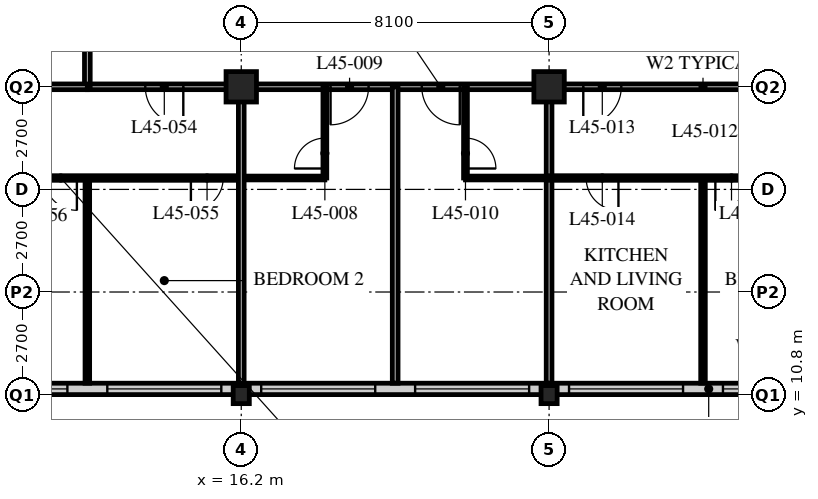
"""IFC4 building model, lengths in metres.
Left out: names, types, materials, properties, quantities, classifications, styles, units other than length and angle.
Written with IfcOpenShell. Run it as: python <this file> out.ifc"""

import sys

from ifc_helpers import new_model, si_unit, direction, frame, frame_2d, origin, origin_2d, place, context, subcontext, project, spatial, rectangle, hollow_rectangle, i_section, extrude, element, fill, save


model = new_model("IFC4")
c1 = context("Model", 3, precision=1e-05, world=origin(), true_north=direction((0.0, 1.0)))
c2 = subcontext(c1, "Body", "Model", "MODEL_VIEW")
j1 = project(units=[si_unit("LENGTHUNIT", "METRE"), si_unit("PLANEANGLEUNIT", "RADIAN")], contexts=[c1])
p1 = place(None, origin())
s1 = spatial("IfcSite", under=j1, at=p1, CompositionType="ELEMENT")
p2 = place(p1, origin())
s2 = spatial("IfcBuilding", under=s1, at=p2, CompositionType="ELEMENT")
p3 = place(p2, frame((0.0, 0.0, 177.6)))
s3 = spatial("IfcBuildingStorey", under=s2, at=p3, CompositionType="ELEMENT", Elevation=177.6)
p4 = place(p3, frame((16.2, 10.8, 0.0), z_axis=(0.0, 0.0, 1.0), x_axis=(1.0, 0.0, 0.0)))
e1 = element("IfcColumn", 1, at=p4, inside=s3, PredefinedType="COLUMN", context=c2, shape_type="SweptSolid", body=[
    extrude(i_section(OverallWidth=0.424, OverallDepth=0.475, WebThickness=0.048, FlangeThickness=0.077, FilletRadius=0.015, at=origin_2d()), origin(), (0.0, 0.0, 1.0), 3.6),
])
p5 = place(p3, frame((16.2, 18.9, 0.0), z_axis=(0.0, 0.0, 1.0), x_axis=(1.0, 0.0, 0.0)))
e2 = element("IfcColumn", 2, at=p5, inside=s3, PredefinedType="COLUMN", context=c2, shape_type="SweptSolid", body=[
    extrude(hollow_rectangle(XDim=0.8, YDim=0.8, WallThickness=0.08, at=origin_2d()), origin(), (0.0, 0.0, 1.0), 3.6),
])
p6 = place(p3, frame((24.3, 10.8, 0.0), z_axis=(0.0, 0.0, 1.0), x_axis=(1.0, 0.0, 0.0)))
e3 = element("IfcColumn", 3, at=p6, inside=s3, PredefinedType="COLUMN", context=c2, shape_type="SweptSolid", body=[
    extrude(i_section(OverallWidth=0.424, OverallDepth=0.475, WebThickness=0.048, FlangeThickness=0.077, FilletRadius=0.015, at=origin_2d()), origin(), (0.0, 0.0, 1.0), 3.6),
])
p7 = place(p3, frame((24.3, 18.9, 0.0), z_axis=(0.0, 0.0, 1.0), x_axis=(1.0, 0.0, 0.0)))
e4 = element("IfcColumn", 4, at=p7, inside=s3, PredefinedType="COLUMN", context=c2, shape_type="SweptSolid", body=[
    extrude(hollow_rectangle(XDim=0.8, YDim=0.8, WallThickness=0.08, at=origin_2d()), origin(), (0.0, 0.0, 1.0), 3.6),
])
p8 = place(p3, frame((8.4, 10.95, 0.0), z_axis=(0.0, 0.0, 1.0), x_axis=(1.0, 0.0, 0.0)))
e5 = element("IfcWall", 5, at=p8, inside=s3, PredefinedType="SOLIDWALL", context=c2, shape_type="SweptSolid", body=[
    extrude(rectangle(XDim=40.2, YDim=0.3, at=frame_2d((20.1, 0.0))), origin(), (0.0, 0.0, 1.0), 3.39),
])
p9 = place(p8, frame((0.225, 0.0, 0.6)))
e6 = element("IfcOpeningElement", 6, at=p9, cuts=e5, PredefinedType="OPENING", context=c2, shape_type="SweptSolid", body=[
    extrude(rectangle(XDim=3.0, YDim=2.4, at=frame_2d((1.5, 1.2))), frame((0.0, 0.16, 0.0), z_axis=(0.0, -1.0, 0.0), x_axis=(1.0, 0.0, 0.0)), (0.0, 0.0, 1.0), 0.32),
])
p10 = place(p8, frame((4.275, 0.0, 0.6)))
e7 = element("IfcOpeningElement", 7, at=p10, cuts=e5, PredefinedType="OPENING", context=c2, shape_type="SweptSolid", body=[
    extrude(rectangle(XDim=3.0, YDim=2.4, at=frame_2d((1.5, 1.2))), frame((0.0, 0.16, 0.0), z_axis=(0.0, -1.0, 0.0), x_axis=(1.0, 0.0, 0.0)), (0.0, 0.0, 1.0), 0.32),
])
p11 = place(p8, frame((8.325, 0.0, 0.6)))
e8 = element("IfcOpeningElement", 8, at=p11, cuts=e5, PredefinedType="OPENING", context=c2, shape_type="SweptSolid", body=[
    extrude(rectangle(XDim=3.0, YDim=2.4, at=frame_2d((1.5, 1.2))), frame((0.0, 0.16, 0.0), z_axis=(0.0, -1.0, 0.0), x_axis=(1.0, 0.0, 0.0)), (0.0, 0.0, 1.0), 0.32),
])
p12 = place(p8, frame((12.375, 0.0, 0.6)))
e9 = element("IfcOpeningElement", 9, at=p12, cuts=e5, PredefinedType="OPENING", context=c2, shape_type="SweptSolid", body=[
    extrude(rectangle(XDim=3.0, YDim=2.4, at=frame_2d((1.5, 1.2))), frame((0.0, 0.16, 0.0), z_axis=(0.0, -1.0, 0.0), x_axis=(1.0, 0.0, 0.0)), (0.0, 0.0, 1.0), 0.32),
])
p13 = place(p8, frame((16.425, 0.0, 0.6)))
e10 = element("IfcOpeningElement", 10, at=p13, cuts=e5, PredefinedType="OPENING", context=c2, shape_type="SweptSolid", body=[
    extrude(rectangle(XDim=3.0, YDim=2.4, at=frame_2d((1.5, 1.2))), frame((0.0, 0.16, 0.0), z_axis=(0.0, -1.0, 0.0), x_axis=(1.0, 0.0, 0.0)), (0.0, 0.0, 1.0), 0.32),
])
p14 = place(p8, frame((20.475, 0.0, 0.6)))
e11 = element("IfcOpeningElement", 11, at=p14, cuts=e5, PredefinedType="OPENING", context=c2, shape_type="SweptSolid", body=[
    extrude(rectangle(XDim=3.0, YDim=2.4, at=frame_2d((1.5, 1.2))), frame((0.0, 0.16, 0.0), z_axis=(0.0, -1.0, 0.0), x_axis=(1.0, 0.0, 0.0)), (0.0, 0.0, 1.0), 0.32),
])
p15 = place(p8, frame((24.525, 0.0, 0.6)))
e12 = element("IfcOpeningElement", 12, at=p15, cuts=e5, PredefinedType="OPENING", context=c2, shape_type="SweptSolid", body=[
    extrude(rectangle(XDim=3.0, YDim=2.4, at=frame_2d((1.5, 1.2))), frame((0.0, 0.16, 0.0), z_axis=(0.0, -1.0, 0.0), x_axis=(1.0, 0.0, 0.0)), (0.0, 0.0, 1.0), 0.32),
])
p16 = place(p8, frame((28.575, 0.0, 0.6)))
e13 = element("IfcOpeningElement", 13, at=p16, cuts=e5, PredefinedType="OPENING", context=c2, shape_type="SweptSolid", body=[
    extrude(rectangle(XDim=3.0, YDim=2.4, at=frame_2d((1.5, 1.2))), frame((0.0, 0.16, 0.0), z_axis=(0.0, -1.0, 0.0), x_axis=(1.0, 0.0, 0.0)), (0.0, 0.0, 1.0), 0.32),
])
p17 = place(p8, frame((32.625, 0.0, 0.6)))
e14 = element("IfcOpeningElement", 14, at=p17, cuts=e5, PredefinedType="OPENING", context=c2, shape_type="SweptSolid", body=[
    extrude(rectangle(XDim=3.0, YDim=2.4, at=frame_2d((1.5, 1.2))), frame((0.0, 0.16, 0.0), z_axis=(0.0, -1.0, 0.0), x_axis=(1.0, 0.0, 0.0)), (0.0, 0.0, 1.0), 0.32),
])
p18 = place(p8, frame((36.675, 0.0, 0.6)))
e15 = element("IfcOpeningElement", 15, at=p18, cuts=e5, PredefinedType="OPENING", context=c2, shape_type="SweptSolid", body=[
    extrude(rectangle(XDim=3.0, YDim=2.4, at=frame_2d((1.5, 1.2))), frame((0.0, 0.16, 0.0), z_axis=(0.0, -1.0, 0.0), x_axis=(1.0, 0.0, 0.0)), (0.0, 0.0, 1.0), 0.32),
])
p19 = place(p3, frame((12.15, 18.9, 0.0), z_axis=(0.0, 0.0, 1.0), x_axis=(1.0, 0.0, 0.0)))
e16 = element("IfcWall", 16, at=p19, inside=s3, PredefinedType="PARTITIONING", context=c2, shape_type="SweptSolid", body=[
    extrude(rectangle(XDim=32.4, YDim=0.15, at=frame_2d((16.2, 0.0))), origin(), (0.0, 0.0, 1.0), 2.778),
])
p20 = place(p19, frame((6.4, 0.0, 0.0)))
e17 = element("IfcOpeningElement", 17, at=p20, cuts=e16, PredefinedType="OPENING", context=c2, shape_type="SweptSolid", body=[
    extrude(rectangle(XDim=1.0, YDim=2.1, at=frame_2d((0.5, 1.05))), frame((0.0, 0.085, 0.0), z_axis=(0.0, -1.0, 0.0), x_axis=(1.0, 0.0, 0.0)), (0.0, 0.0, 1.0), 0.17),
])
p21 = place(p19, frame((8.8, 0.0, 0.0)))
e18 = element("IfcOpeningElement", 18, at=p21, cuts=e16, PredefinedType="OPENING", context=c2, shape_type="SweptSolid", body=[
    extrude(rectangle(XDim=1.0, YDim=2.1, at=frame_2d((0.5, 1.05))), frame((0.0, 0.085, 0.0), z_axis=(0.0, -1.0, 0.0), x_axis=(1.0, 0.0, 0.0)), (0.0, 0.0, 1.0), 0.17),
])
p22 = place(p19, frame((13.05, 0.0, 0.0)))
e19 = element("IfcOpeningElement", 19, at=p22, cuts=e16, PredefinedType="OPENING", context=c2, shape_type="SweptSolid", body=[
    extrude(rectangle(XDim=1.0, YDim=2.1, at=frame_2d((0.5, 1.05))), frame((0.0, 0.085, 0.0), z_axis=(0.0, -1.0, 0.0), x_axis=(1.0, 0.0, 0.0)), (0.0, 0.0, 1.0), 0.17),
])
p23 = place(p19, frame((22.6, 0.0, 0.0)))
e20 = element("IfcOpeningElement", 20, at=p23, cuts=e16, PredefinedType="OPENING", context=c2, shape_type="SweptSolid", body=[
    extrude(rectangle(XDim=1.0, YDim=2.1, at=frame_2d((0.5, 1.05))), frame((0.0, 0.085, 0.0), z_axis=(0.0, -1.0, 0.0), x_axis=(1.0, 0.0, 0.0)), (0.0, 0.0, 1.0), 0.17),
])
p24 = place(p19, frame((25.0, 0.0, 0.0)))
e21 = element("IfcOpeningElement", 21, at=p24, cuts=e16, PredefinedType="OPENING", context=c2, shape_type="SweptSolid", body=[
    extrude(rectangle(XDim=1.0, YDim=2.1, at=frame_2d((0.5, 1.05))), frame((0.0, 0.085, 0.0), z_axis=(0.0, -1.0, 0.0), x_axis=(1.0, 0.0, 0.0)), (0.0, 0.0, 1.0), 0.17),
])
p25 = place(p19, frame((1.525, 0.0, 0.0)))
e22 = element("IfcOpeningElement", 22, at=p25, cuts=e16, PredefinedType="OPENING", context=c2, shape_type="SweptSolid", body=[
    extrude(rectangle(XDim=1.0, YDim=2.1, at=frame_2d((0.5, 1.05))), frame((0.0, 0.085, 0.0), z_axis=(0.0, -1.0, 0.0), x_axis=(1.0, 0.0, 0.0)), (0.0, 0.0, 1.0), 0.17),
])
p26 = place(p19, frame((29.875, 0.0, 0.0)))
e23 = element("IfcOpeningElement", 23, at=p26, cuts=e16, PredefinedType="OPENING", context=c2, shape_type="SweptSolid", body=[
    extrude(rectangle(XDim=1.0, YDim=2.1, at=frame_2d((0.5, 1.05))), frame((0.0, 0.085, 0.0), z_axis=(0.0, -1.0, 0.0), x_axis=(1.0, 0.0, 0.0)), (0.0, 0.0, 1.0), 0.17),
])
p27 = place(p3, frame((12.15, 18.9, 0.0), z_axis=(0.0, 0.0, 1.0), x_axis=(0.0, 1.0, 0.0)))
e24 = element("IfcWall", 24, at=p27, inside=s3, PredefinedType="PARTITIONING", context=c2, shape_type="SweptSolid", body=[
    extrude(rectangle(XDim=24.3, YDim=0.15, at=frame_2d((12.15, 0.0))), origin(), (0.0, 0.0, 1.0), 3.39),
])
p28 = place(p27, frame((2.35, 0.0, 0.0)))
e25 = element("IfcOpeningElement", 25, at=p28, cuts=e24, PredefinedType="OPENING", context=c2, shape_type="SweptSolid", body=[
    extrude(rectangle(XDim=1.0, YDim=2.1, at=frame_2d((0.5, 1.05))), frame((0.0, 0.085, 0.0), z_axis=(0.0, -1.0, 0.0), x_axis=(1.0, 0.0, 0.0)), (0.0, 0.0, 1.0), 0.17),
])
p29 = place(p27, frame((6.4, 0.0, 0.0)))
e26 = element("IfcOpeningElement", 26, at=p29, cuts=e24, PredefinedType="OPENING", context=c2, shape_type="SweptSolid", body=[
    extrude(rectangle(XDim=1.0, YDim=2.1, at=frame_2d((0.5, 1.05))), frame((0.0, 0.085, 0.0), z_axis=(0.0, -1.0, 0.0), x_axis=(1.0, 0.0, 0.0)), (0.0, 0.0, 1.0), 0.17),
])
p30 = place(p27, frame((8.5, 0.0, 0.0)))
e27 = element("IfcOpeningElement", 27, at=p30, cuts=e24, PredefinedType="OPENING", context=c2, shape_type="SweptSolid", body=[
    extrude(rectangle(XDim=1.0, YDim=2.1, at=frame_2d((0.5, 1.05))), frame((0.0, 0.085, 0.0), z_axis=(0.0, -1.0, 0.0), x_axis=(1.0, 0.0, 0.0)), (0.0, 0.0, 1.0), 0.17),
])
p31 = place(p27, frame((16.6, 0.0, 0.0)))
e28 = element("IfcOpeningElement", 28, at=p31, cuts=e24, PredefinedType="OPENING", context=c2, shape_type="SweptSolid", body=[
    extrude(rectangle(XDim=1.0, YDim=2.1, at=frame_2d((0.5, 1.05))), frame((0.0, 0.085, 0.0), z_axis=(0.0, -1.0, 0.0), x_axis=(1.0, 0.0, 0.0)), (0.0, 0.0, 1.0), 0.17),
])
p32 = place(p3, frame((16.2, 16.5, 0.0), z_axis=(0.0, 0.0, 1.0), x_axis=(1.0, 0.0, 0.0)))
e29 = element("IfcWall", 29, at=p32, inside=s3, PredefinedType="PARTITIONING", context=c2, shape_type="SweptSolid", body=[
    extrude(rectangle(XDim=2.2, YDim=0.1, at=frame_2d((1.1, 0.0))), origin(), (0.0, 0.0, 1.0), 3.39),
])
p33 = place(p3, frame((18.4, 18.9, 0.0), z_axis=(0.0, 0.0, 1.0), x_axis=(0.0, -1.0, 0.0)))
e30 = element("IfcWall", 30, at=p33, inside=s3, PredefinedType="PARTITIONING", context=c2, shape_type="SweptSolid", body=[
    extrude(rectangle(XDim=2.4, YDim=0.1, at=frame_2d((1.2, 0.0))), origin(), (0.0, 0.0, 1.0), 3.39),
])
p34 = place(p33, frame((1.35, 0.0, 0.0)))
e31 = element("IfcOpeningElement", 31, at=p34, cuts=e30, PredefinedType="OPENING", context=c2, shape_type="SweptSolid", body=[
    extrude(rectangle(XDim=0.8, YDim=2.1, at=frame_2d((0.4, 1.05))), frame((0.0, 0.06, 0.0), z_axis=(0.0, -1.0, 0.0), x_axis=(1.0, 0.0, 0.0)), (0.0, 0.0, 1.0), 0.12),
])
p35 = place(p3, frame((20.25, 18.9, 0.0), z_axis=(0.0, 0.0, 1.0), x_axis=(0.0, -1.0, 0.0)))
e32 = element("IfcWall", 32, at=p35, inside=s3, PredefinedType="PARTITIONING", context=c2, shape_type="SweptSolid", body=[
    extrude(rectangle(XDim=7.8, YDim=0.15, at=frame_2d((3.9, 0.0))), origin(), (0.0, 0.0, 1.0), 3.39),
])
p36 = place(p3, frame((22.1, 16.5, 0.0), z_axis=(0.0, 0.0, 1.0), x_axis=(1.0, 0.0, 0.0)))
e33 = element("IfcWall", 33, at=p36, inside=s3, PredefinedType="PARTITIONING", context=c2, shape_type="SweptSolid", body=[
    extrude(rectangle(XDim=2.2, YDim=0.1, at=frame_2d((1.1, 0.0))), origin(), (0.0, 0.0, 1.0), 3.39),
])
p37 = place(p3, frame((22.1, 18.9, 0.0), z_axis=(0.0, 0.0, 1.0), x_axis=(0.0, -1.0, 0.0)))
e34 = element("IfcWall", 34, at=p37, inside=s3, PredefinedType="PARTITIONING", context=c2, shape_type="SweptSolid", body=[
    extrude(rectangle(XDim=2.4, YDim=0.1, at=frame_2d((1.2, 0.0))), origin(), (0.0, 0.0, 1.0), 3.39),
])
p38 = place(p37, frame((1.35, 0.0, 0.0)))
e35 = element("IfcOpeningElement", 35, at=p38, cuts=e34, PredefinedType="OPENING", context=c2, shape_type="SweptSolid", body=[
    extrude(rectangle(XDim=0.8, YDim=2.1, at=frame_2d((0.4, 1.05))), frame((0.0, 0.06, 0.0), z_axis=(0.0, -1.0, 0.0), x_axis=(1.0, 0.0, 0.0)), (0.0, 0.0, 1.0), 0.12),
])
p39 = place(p3, frame((24.3, 18.9, 0.0), z_axis=(0.0, 0.0, 1.0), x_axis=(0.0, -1.0, 0.0)))
e36 = element("IfcWall", 36, at=p39, inside=s3, PredefinedType="PARTITIONING", context=c2, shape_type="SweptSolid", body=[
    extrude(rectangle(XDim=7.8, YDim=0.15, at=frame_2d((3.9, 0.0))), origin(), (0.0, 0.0, 1.0), 2.778),
])
p40 = place(p3, frame((24.3, 16.5, 0.0), z_axis=(0.0, 0.0, 1.0), x_axis=(1.0, 0.0, 0.0)))
e37 = element("IfcWall", 37, at=p40, inside=s3, PredefinedType="PARTITIONING", context=c2, shape_type="SweptSolid", body=[
    extrude(rectangle(XDim=8.1, YDim=0.12, at=frame_2d((4.05, 0.0))), origin(), (0.0, 0.0, 1.0), 3.39),
])
p41 = place(p40, frame((0.975, 0.0, 0.0)))
e38 = element("IfcOpeningElement", 38, at=p41, cuts=e37, PredefinedType="OPENING", context=c2, shape_type="SweptSolid", body=[
    extrude(rectangle(XDim=0.85, YDim=2.1, at=frame_2d((0.425, 1.05))), frame((0.0, 0.07, 0.0), z_axis=(0.0, -1.0, 0.0), x_axis=(1.0, 0.0, 0.0)), (0.0, 0.0, 1.0), 0.14),
])
p42 = place(p40, frame((4.375, 0.0, 0.0)))
e39 = element("IfcOpeningElement", 39, at=p42, cuts=e37, PredefinedType="OPENING", context=c2, shape_type="SweptSolid", body=[
    extrude(rectangle(XDim=0.85, YDim=2.1, at=frame_2d((0.425, 1.05))), frame((0.0, 0.07, 0.0), z_axis=(0.0, -1.0, 0.0), x_axis=(1.0, 0.0, 0.0)), (0.0, 0.0, 1.0), 0.14),
])
p43 = place(p3, frame((28.35, 16.5, 0.0), z_axis=(0.0, 0.0, 1.0), x_axis=(0.0, -1.0, 0.0)))
e40 = element("IfcWall", 40, at=p43, inside=s3, PredefinedType="PARTITIONING", context=c2, shape_type="SweptSolid", body=[
    extrude(rectangle(XDim=5.4, YDim=0.12, at=frame_2d((2.7, 0.0))), origin(), (0.0, 0.0, 1.0), 3.39),
])
p44 = place(p3, frame((8.15, 16.5, 0.0), z_axis=(0.0, 0.0, 1.0), x_axis=(1.0, 0.0, 0.0)))
e41 = element("IfcWall", 41, at=p44, inside=s3, PredefinedType="PARTITIONING", context=c2, shape_type="SweptSolid", body=[
    extrude(rectangle(XDim=8.05, YDim=0.12, at=frame_2d((4.025, 0.0))), origin(), (0.0, 0.0, 1.0), 3.39),
])
p45 = place(p44, frame((6.725, 0.0, 0.0)))
e42 = element("IfcOpeningElement", 42, at=p45, cuts=e41, PredefinedType="OPENING", context=c2, shape_type="SweptSolid", body=[
    extrude(rectangle(XDim=0.85, YDim=2.1, at=frame_2d((0.425, 1.05))), frame((0.0, 0.07, 0.0), z_axis=(0.0, -1.0, 0.0), x_axis=(1.0, 0.0, 0.0)), (0.0, 0.0, 1.0), 0.14),
])
p46 = place(p44, frame((2.875, 0.0, 0.0)))
e43 = element("IfcOpeningElement", 43, at=p46, cuts=e41, PredefinedType="OPENING", context=c2, shape_type="SweptSolid", body=[
    extrude(rectangle(XDim=0.85, YDim=2.1, at=frame_2d((0.425, 1.05))), frame((0.0, 0.07, 0.0), z_axis=(0.0, -1.0, 0.0), x_axis=(1.0, 0.0, 0.0)), (0.0, 0.0, 1.0), 0.14),
])
p47 = place(p3, frame((12.15, 16.5, 0.0), z_axis=(0.0, 0.0, 1.0), x_axis=(0.0, -1.0, 0.0)))
e44 = element("IfcWall", 44, at=p47, inside=s3, PredefinedType="PARTITIONING", context=c2, shape_type="SweptSolid", body=[
    extrude(rectangle(XDim=5.4, YDim=0.12, at=frame_2d((2.7, 0.0))), origin(), (0.0, 0.0, 1.0), 3.39),
])
for number, where, z_axis, x_axis in (
    (45, (4.35, 18.9, 0.0), (0.0, 0.0, 1.0), (1.0, 0.0, 0.0)),
    (46, (16.2, 18.9, 0.0), (0.0, 0.0, 1.0), (0.0, -1.0, 0.0)),
):
    element("IfcWall", number, at=place(p3, frame(where, z_axis=z_axis, x_axis=x_axis)), inside=s3, PredefinedType="PARTITIONING", context=c2, shape_type="SweptSolid", body=[
        extrude(rectangle(XDim=7.8, YDim=0.15, at=frame_2d((3.9, 0.0))), origin(), (0.0, 0.0, 1.0), 2.778),
    ])
p48 = place(p9, origin())
e47 = element("IfcWindow", 47, at=p48, inside=s3, PartitioningType="SINGLE_PANEL", PredefinedType="WINDOW", context=c2, shape_type="SweptSolid", body=[
    extrude(rectangle(XDim=3.0, YDim=2.4, at=frame_2d((1.5, 1.2))), frame((0.0, 0.03, 0.0), z_axis=(0.0, -1.0, 0.0), x_axis=(1.0, 0.0, 0.0)), (0.0, 0.0, 1.0), 0.06),
])
fill(e6, e47)
p49 = place(p10, origin())
e48 = element("IfcWindow", 48, at=p49, inside=s3, PartitioningType="SINGLE_PANEL", PredefinedType="WINDOW", context=c2, shape_type="SweptSolid", body=[
    extrude(rectangle(XDim=3.0, YDim=2.4, at=frame_2d((1.5, 1.2))), frame((0.0, 0.03, 0.0), z_axis=(0.0, -1.0, 0.0), x_axis=(1.0, 0.0, 0.0)), (0.0, 0.0, 1.0), 0.06),
])
fill(e7, e48)
p50 = place(p11, origin())
e49 = element("IfcWindow", 49, at=p50, inside=s3, PartitioningType="SINGLE_PANEL", PredefinedType="WINDOW", context=c2, shape_type="SweptSolid", body=[
    extrude(rectangle(XDim=3.0, YDim=2.4, at=frame_2d((1.5, 1.2))), frame((0.0, 0.03, 0.0), z_axis=(0.0, -1.0, 0.0), x_axis=(1.0, 0.0, 0.0)), (0.0, 0.0, 1.0), 0.06),
])
fill(e8, e49)
p51 = place(p12, origin())
e50 = element("IfcWindow", 50, at=p51, inside=s3, PartitioningType="SINGLE_PANEL", PredefinedType="WINDOW", context=c2, shape_type="SweptSolid", body=[
    extrude(rectangle(XDim=3.0, YDim=2.4, at=frame_2d((1.5, 1.2))), frame((0.0, 0.03, 0.0), z_axis=(0.0, -1.0, 0.0), x_axis=(1.0, 0.0, 0.0)), (0.0, 0.0, 1.0), 0.06),
])
fill(e9, e50)
p52 = place(p13, origin())
e51 = element("IfcWindow", 51, at=p52, inside=s3, PartitioningType="SINGLE_PANEL", PredefinedType="WINDOW", context=c2, shape_type="SweptSolid", body=[
    extrude(rectangle(XDim=3.0, YDim=2.4, at=frame_2d((1.5, 1.2))), frame((0.0, 0.03, 0.0), z_axis=(0.0, -1.0, 0.0), x_axis=(1.0, 0.0, 0.0)), (0.0, 0.0, 1.0), 0.06),
])
fill(e10, e51)
p53 = place(p14, origin())
e52 = element("IfcWindow", 52, at=p53, inside=s3, PartitioningType="SINGLE_PANEL", PredefinedType="WINDOW", context=c2, shape_type="SweptSolid", body=[
    extrude(rectangle(XDim=3.0, YDim=2.4, at=frame_2d((1.5, 1.2))), frame((0.0, 0.03, 0.0), z_axis=(0.0, -1.0, 0.0), x_axis=(1.0, 0.0, 0.0)), (0.0, 0.0, 1.0), 0.06),
])
fill(e11, e52)
p54 = place(p34, origin())
e53 = element("IfcDoor", 53, at=p54, inside=s3, OperationType="SINGLE_SWING_LEFT", PredefinedType="DOOR", context=c2, shape_type="SweptSolid", body=[
    extrude(rectangle(XDim=0.8, YDim=2.1, at=frame_2d((0.4, 1.05))), frame((0.0, 0.025, 0.0), z_axis=(0.0, -1.0, 0.0), x_axis=(1.0, 0.0, 0.0)), (0.0, 0.0, 1.0), 0.05),
])
fill(e31, e53)
p55 = place(p20, origin())
e54 = element("IfcDoor", 54, at=p55, inside=s3, OperationType="SINGLE_SWING_RIGHT", PredefinedType="DOOR", context=c2, shape_type="SweptSolid", body=[
    extrude(rectangle(XDim=1.0, YDim=2.1, at=frame_2d((0.5, 1.05))), frame((0.0, 0.025, 0.0), z_axis=(0.0, -1.0, 0.0), x_axis=(1.0, 0.0, 0.0)), (0.0, 0.0, 1.0), 0.05),
])
fill(e17, e54)
p56 = place(p38, origin())
e55 = element("IfcDoor", 55, at=p56, inside=s3, OperationType="SINGLE_SWING_RIGHT", PredefinedType="DOOR", context=c2, shape_type="SweptSolid", body=[
    extrude(rectangle(XDim=0.8, YDim=2.1, at=frame_2d((0.4, 1.05))), frame((0.0, 0.025, 0.0), z_axis=(0.0, -1.0, 0.0), x_axis=(1.0, 0.0, 0.0)), (0.0, 0.0, 1.0), 0.05),
])
fill(e35, e55)
p57 = place(p21, origin())
e56 = element("IfcDoor", 56, at=p57, inside=s3, OperationType="SINGLE_SWING_LEFT", PredefinedType="DOOR", context=c2, shape_type="SweptSolid", body=[
    extrude(rectangle(XDim=1.0, YDim=2.1, at=frame_2d((0.5, 1.05))), frame((0.0, 0.025, 0.0), z_axis=(0.0, -1.0, 0.0), x_axis=(1.0, 0.0, 0.0)), (0.0, 0.0, 1.0), 0.05),
])
fill(e18, e56)
p58 = place(p22, origin())
e57 = element("IfcDoor", 57, at=p58, inside=s3, OperationType="SINGLE_SWING_RIGHT", PredefinedType="DOOR", context=c2, shape_type="SweptSolid", body=[
    extrude(rectangle(XDim=1.0, YDim=2.1, at=frame_2d((0.5, 1.05))), frame((0.0, 0.025, 0.0), z_axis=(0.0, -1.0, 0.0), x_axis=(1.0, 0.0, 0.0)), (0.0, 0.0, 1.0), 0.05),
])
fill(e19, e57)
p59 = place(p41, origin())
e58 = element("IfcDoor", 58, at=p59, inside=s3, OperationType="SINGLE_SWING_LEFT", PredefinedType="DOOR", context=c2, shape_type="SweptSolid", body=[
    extrude(rectangle(XDim=0.85, YDim=2.1, at=frame_2d((0.425, 1.05))), frame((0.0, 0.025, 0.0), z_axis=(0.0, -1.0, 0.0), x_axis=(1.0, 0.0, 0.0)), (0.0, 0.0, 1.0), 0.05),
])
fill(e38, e58)
p60 = place(p42, origin())
e59 = element("IfcDoor", 59, at=p60, inside=s3, OperationType="SINGLE_SWING_RIGHT", PredefinedType="DOOR", context=c2, shape_type="SweptSolid", body=[
    extrude(rectangle(XDim=0.85, YDim=2.1, at=frame_2d((0.425, 1.05))), frame((0.0, 0.025, 0.0), z_axis=(0.0, -1.0, 0.0), x_axis=(1.0, 0.0, 0.0)), (0.0, 0.0, 1.0), 0.05),
])
fill(e39, e59)
p61 = place(p25, origin())
e60 = element("IfcDoor", 60, at=p61, inside=s3, OperationType="SINGLE_SWING_LEFT", PredefinedType="DOOR", context=c2, shape_type="SweptSolid", body=[
    extrude(rectangle(XDim=1.0, YDim=2.1, at=frame_2d((0.5, 1.05))), frame((0.0, 0.025, 0.0), z_axis=(0.0, -1.0, 0.0), x_axis=(1.0, 0.0, 0.0)), (0.0, 0.0, 1.0), 0.05),
])
fill(e22, e60)
p62 = place(p45, origin())
e61 = element("IfcDoor", 61, at=p62, inside=s3, OperationType="SINGLE_SWING_RIGHT", PredefinedType="DOOR", context=c2, shape_type="SweptSolid", body=[
    extrude(rectangle(XDim=0.85, YDim=2.1, at=frame_2d((0.425, 1.05))), frame((0.0, 0.025, 0.0), z_axis=(0.0, -1.0, 0.0), x_axis=(1.0, 0.0, 0.0)), (0.0, 0.0, 1.0), 0.05),
])
fill(e42, e61)
p63 = place(p46, origin())
e62 = element("IfcDoor", 62, at=p63, inside=s3, OperationType="SINGLE_SWING_LEFT", PredefinedType="DOOR", context=c2, shape_type="SweptSolid", body=[
    extrude(rectangle(XDim=0.85, YDim=2.1, at=frame_2d((0.425, 1.05))), frame((0.0, 0.025, 0.0), z_axis=(0.0, -1.0, 0.0), x_axis=(1.0, 0.0, 0.0)), (0.0, 0.0, 1.0), 0.05),
])
fill(e43, e62)
save(model, sys.argv[1])
